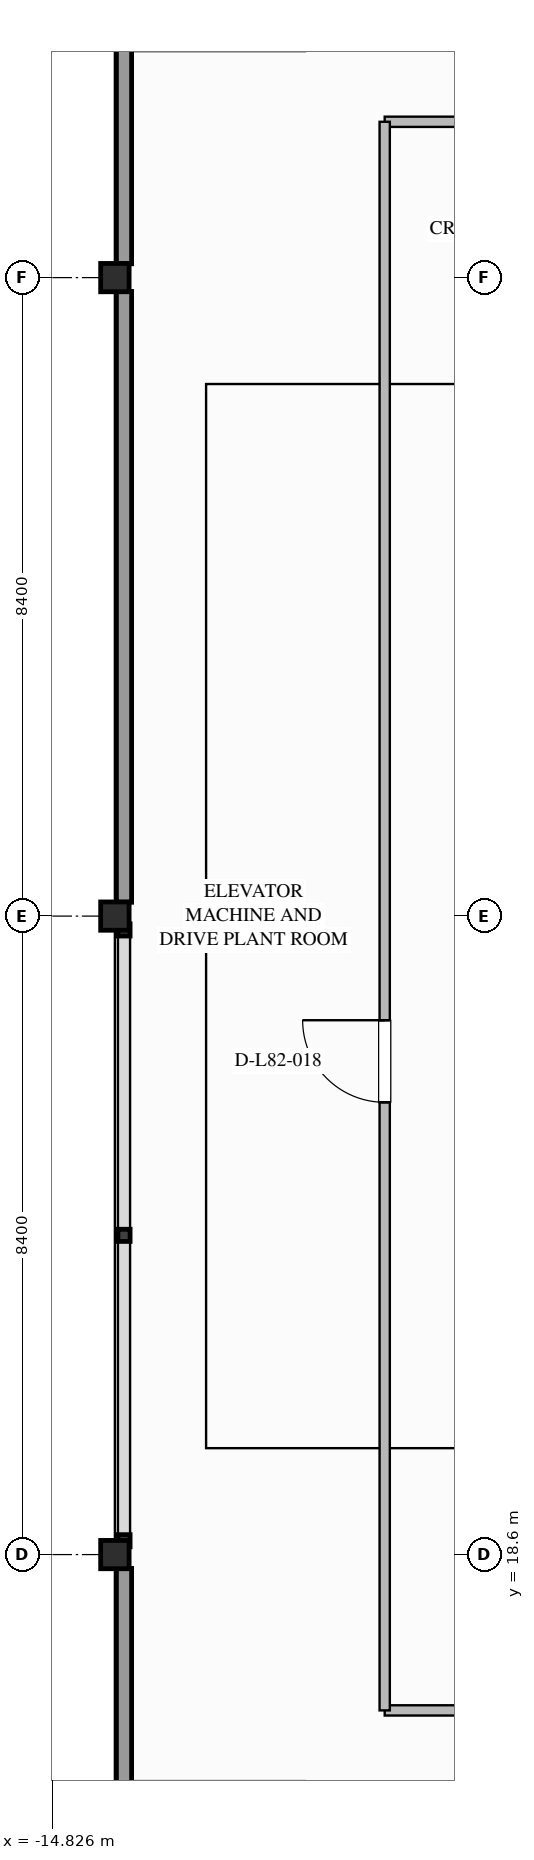
"""IFC4 building model, lengths in metres.
Left out: names, types, materials, properties, quantities, classifications, styles, units other than length and angle.
Written with IfcOpenShell. Run it as: python <this file> out.ifc"""

import sys

from ifc_helpers import new_model, si_unit, direction, frame, frame_2d, origin, origin_2d, place, context, subcontext, project, spatial, rectangle, i_section, extrude, element, fill, save


model = new_model("IFC4")
c1 = context("Model", 3, precision=1e-05, world=origin(), true_north=direction((0.0, 1.0)))
c2 = subcontext(c1, "Body", "Model", "MODEL_VIEW")
j1 = project(units=[si_unit("LENGTHUNIT", "METRE"), si_unit("PLANEANGLEUNIT", "RADIAN")], contexts=[c1])
p1 = place(None, origin())
s1 = spatial("IfcSite", under=j1, at=p1, CompositionType="ELEMENT")
p2 = place(p1, origin())
s2 = spatial("IfcBuilding", under=s1, at=p2, CompositionType="ELEMENT")
p3 = place(p2, frame((0.0, 0.0, 315.4)))
s3 = spatial("IfcBuildingStorey", under=s2, at=p3, CompositionType="ELEMENT", Elevation=315.4)
for number, where, z_axis, x_axis in (
    (1, (-14.0, 18.6, 0.0), (0.0, 0.0, 1.0), (1.0, 0.0, 0.0)),
    (2, (-14.0, 27.0, 0.0), (0.0, 0.0, 1.0), (1.0, 0.0, 0.0)),
    (3, (-14.0, 35.4, 0.0), (0.0, 0.0, 1.0), (1.0, 0.0, 0.0)),
):
    element("IfcColumn", number, at=place(p3, frame(where, z_axis=z_axis, x_axis=x_axis)), inside=s3, PredefinedType="COLUMN", context=c2, shape_type="SweptSolid", body=[
        extrude(i_section(OverallWidth=0.374, OverallDepth=0.372, WebThickness=0.016, FlangeThickness=0.026, FilletRadius=0.025, at=origin_2d()), origin(), (0.0, 0.0, 1.0), 3.997),
    ])
p4 = place(p3, frame((-10.45, 16.55, 0.0), z_axis=(0.0, 0.0, 1.0), x_axis=(1.0, 0.0, 0.0)))
e4 = element("IfcWall", 4, at=p4, inside=s3, PredefinedType="PARTITIONING", context=c2, shape_type="SweptSolid", body=[
    extrude(rectangle(XDim=20.9, YDim=0.135, at=frame_2d((10.45, 0.0))), origin(), (0.0, 0.0, 1.0), 3.68),
])
p5 = place(p4, frame((3.0, 0.0, 0.0)))
e5 = element("IfcOpeningElement", 5, at=p5, cuts=e4, PredefinedType="OPENING", context=c2, shape_type="SweptSolid", body=[
    extrude(rectangle(XDim=1.08, YDim=2.04, at=frame_2d((0.54, 1.02))), frame((0.0, 0.077, 0.0), z_axis=(0.0, -1.0, 0.0), x_axis=(1.0, 0.0, 0.0)), (0.0, 0.0, 1.0), 0.155),
])
p6 = place(p4, frame((15.0, 0.0, 0.0)))
e6 = element("IfcOpeningElement", 6, at=p6, cuts=e4, PredefinedType="OPENING", context=c2, shape_type="SweptSolid", body=[
    extrude(rectangle(XDim=1.08, YDim=2.04, at=frame_2d((0.54, 1.02))), frame((0.0, 0.077, 0.0), z_axis=(0.0, -1.0, 0.0), x_axis=(1.0, 0.0, 0.0)), (0.0, 0.0, 1.0), 0.155),
])
p7 = place(p3, frame((-10.45, 37.45, 0.0), z_axis=(0.0, 0.0, 1.0), x_axis=(1.0, 0.0, 0.0)))
e7 = element("IfcWall", 7, at=p7, inside=s3, PredefinedType="PARTITIONING", context=c2, shape_type="SweptSolid", body=[
    extrude(rectangle(XDim=20.9, YDim=0.135, at=frame_2d((10.45, 0.0))), origin(), (0.0, 0.0, 1.0), 3.68),
])
p8 = place(p7, frame((3.0, 0.0, 0.0)))
e8 = element("IfcOpeningElement", 8, at=p8, cuts=e7, PredefinedType="OPENING", context=c2, shape_type="SweptSolid", body=[
    extrude(rectangle(XDim=1.08, YDim=2.04, at=frame_2d((0.54, 1.02))), frame((0.0, 0.077, 0.0), z_axis=(0.0, -1.0, 0.0), x_axis=(1.0, 0.0, 0.0)), (0.0, 0.0, 1.0), 0.155),
])
p9 = place(p7, frame((15.0, 0.0, 0.0)))
e9 = element("IfcOpeningElement", 9, at=p9, cuts=e7, PredefinedType="OPENING", context=c2, shape_type="SweptSolid", body=[
    extrude(rectangle(XDim=1.08, YDim=2.04, at=frame_2d((0.54, 1.02))), frame((0.0, 0.077, 0.0), z_axis=(0.0, -1.0, 0.0), x_axis=(1.0, 0.0, 0.0)), (0.0, 0.0, 1.0), 0.155),
])
p10 = place(p3, frame((-10.45, 16.55, 0.0), z_axis=(0.0, 0.0, 1.0), x_axis=(0.0, 1.0, 0.0)))
e10 = element("IfcWall", 10, at=p10, inside=s3, PredefinedType="PARTITIONING", context=c2, shape_type="SweptSolid", body=[
    extrude(rectangle(XDim=20.9, YDim=0.135, at=frame_2d((10.45, 0.0))), origin(), (0.0, 0.0, 1.0), 3.68),
])
p11 = place(p10, frame((8.0, 0.0, 0.0)))
e11 = element("IfcOpeningElement", 11, at=p11, cuts=e10, PredefinedType="OPENING", context=c2, shape_type="SweptSolid", body=[
    extrude(rectangle(XDim=1.08, YDim=2.04, at=frame_2d((0.54, 1.02))), frame((0.0, 0.077, 0.0), z_axis=(0.0, -1.0, 0.0), x_axis=(1.0, 0.0, 0.0)), (0.0, 0.0, 1.0), 0.155),
])
p12 = place(p11, origin())
e12 = element("IfcDoor", 12, at=p12, inside=s3, OperationType="SINGLE_SWING_RIGHT", PredefinedType="DOOR", context=c2, shape_type="SweptSolid", body=[
    extrude(rectangle(XDim=1.08, YDim=2.04, at=frame_2d((0.54, 1.02))), frame((0.0, 0.025, 0.0), z_axis=(0.0, -1.0, 0.0), x_axis=(1.0, 0.0, 0.0)), (0.0, 0.0, 1.0), 0.05),
])
fill(e11, e12)
save(model, sys.argv[1])
